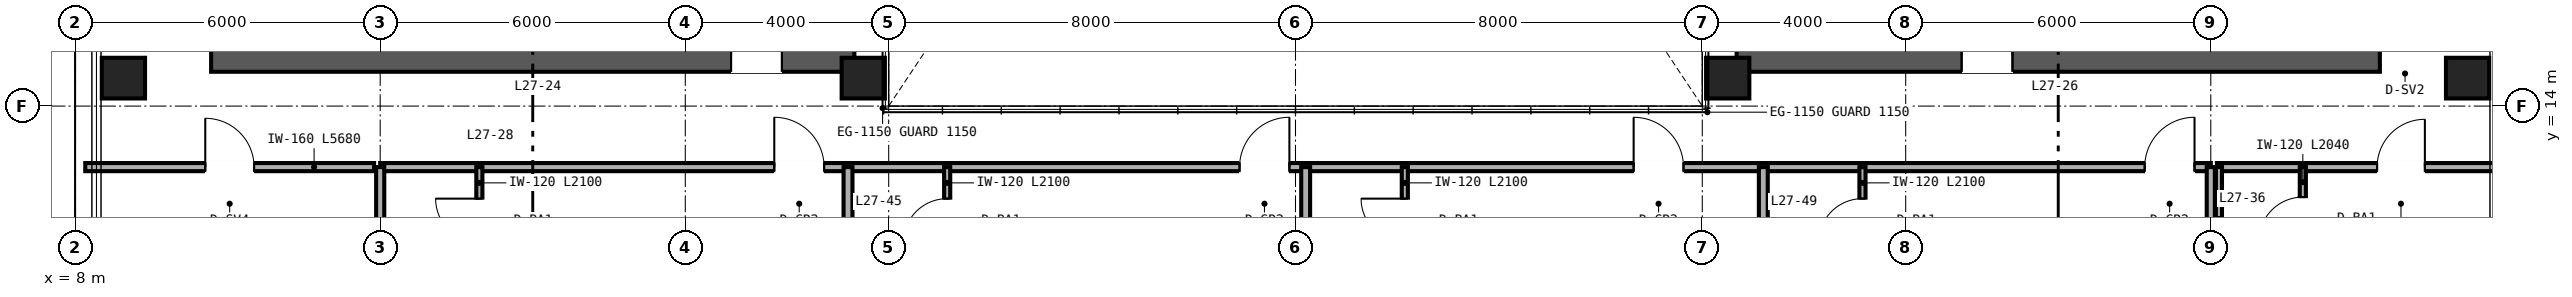
"""IFC4 building model, lengths in metres.
Left out: names, types, materials, properties, quantities, classifications, styles, units other than length and angle.
Written with IfcOpenShell. Run it as: python <this file> out.ifc"""

import sys

from ifc_helpers import new_model, si_unit, direction, frame, frame_2d, origin, origin_2d, place, context, subcontext, project, spatial, rectangle, hollow_rectangle, extrude, source, transform, mapped, element, fill, save


model = new_model("IFC4")
c1 = context("Model", 3, precision=1e-05, world=origin(), true_north=direction((0.0, 1.0)))
c2 = subcontext(c1, "Body", "Model", "MODEL_VIEW")
j1 = project(units=[si_unit("LENGTHUNIT", "METRE"), si_unit("PLANEANGLEUNIT", "RADIAN")], contexts=[c1])
p1 = place(None, origin())
s1 = spatial("IfcSite", under=j1, at=p1, CompositionType="ELEMENT")
p2 = place(p1, origin())
s2 = spatial("IfcBuilding", under=s1, at=p2, CompositionType="ELEMENT")
p3 = place(p2, frame((0.0, 0.0, 111.6)))
s3 = spatial("IfcBuildingStorey", under=s2, at=p3, CompositionType="ELEMENT", Elevation=111.6)
p4 = place(p3, frame((10.675, 15.0, 0.0), z_axis=(0.0, 0.0, 1.0), x_axis=(1.0, 0.0, 0.0)))
e1 = element("IfcWall", 1, at=p4, inside=s3, PredefinedType="SHEAR", context=c2, shape_type="SweptSolid", body=[
    extrude(rectangle(XDim=12.65, YDim=0.65, at=frame_2d((6.325, 0.0))), origin(), (0.0, 0.0, 1.0), 3.36),
])
p5 = place(p4, frame((10.225, 0.0, 0.0)))
e2 = element("IfcOpeningElement", 2, at=p5, cuts=e1, PredefinedType="OPENING", context=c2, shape_type="SweptSolid", body=[
    extrude(rectangle(XDim=1.0, YDim=2.15, at=frame_2d((0.5, 1.075))), frame((0.0, 0.335, 0.0), z_axis=(0.0, -1.0, 0.0), x_axis=(1.0, 0.0, 0.0)), (0.0, 0.0, 1.0), 0.67),
])
p6 = place(p3, frame((40.675, 15.0, 0.0), z_axis=(0.0, 0.0, 1.0), x_axis=(1.0, 0.0, 0.0)))
e3 = element("IfcWall", 3, at=p6, inside=s3, PredefinedType="SHEAR", context=c2, shape_type="SweptSolid", body=[
    extrude(rectangle(XDim=12.65, YDim=0.65, at=frame_2d((6.325, 0.0))), origin(), (0.0, 0.0, 1.0), 3.36),
])
p7 = place(p6, frame((4.425, 0.0, 0.0)))
e4 = element("IfcOpeningElement", 4, at=p7, cuts=e3, PredefinedType="OPENING", context=c2, shape_type="SweptSolid", body=[
    extrude(rectangle(XDim=1.0, YDim=2.15, at=frame_2d((0.5, 1.075))), frame((0.0, 0.335, 0.0), z_axis=(0.0, -1.0, 0.0), x_axis=(1.0, 0.0, 0.0)), (0.0, 0.0, 1.0), 0.67),
])
m1 = source(origin(), c2, "Body", "SweptSolid", [
    extrude(hollow_rectangle(XDim=0.85, YDim=0.8, WallThickness=0.032, at=origin_2d()), origin(), (0.0, 0.0, 1.0), 3.36),
])
for number, where, z_axis, x_axis in (
    (5, (8.95, 14.55, 0.0), (0.0, 0.0, 1.0), (1.0, 0.0, 0.0)),
    (6, (23.5, 14.55, 0.0), (0.0, 0.0, 1.0), (1.0, 0.0, 0.0)),
    (7, (40.5, 14.55, 0.0), (0.0, 0.0, 1.0), (1.0, 0.0, 0.0)),
    (8, (55.05, 14.55, 0.0), (0.0, 0.0, 1.0), (1.0, 0.0, 0.0)),
):
    element("IfcColumn", number, at=place(p3, frame(where, z_axis=z_axis, x_axis=x_axis)), inside=s3, PredefinedType="COLUMN", context=c2, shape_type="MappedRepresentation", body=[
        mapped(m1, transform((0.0, 0.0, 0.0), scale=1.0)),
    ])
p8 = place(p3, frame((8.2, 12.8, 0.0), z_axis=(0.0, 0.0, 1.0), x_axis=(1.0, 0.0, 0.0)))
e9 = element("IfcWall", 9, at=p8, inside=s3, PredefinedType="PARTITIONING", context=c2, shape_type="SweptSolid", body=[
    extrude(rectangle(XDim=5.68, YDim=0.16, at=frame_2d((2.84, 0.0))), origin(), (0.0, 0.0, 1.0), 3.36),
])
p9 = place(p8, frame((2.36, 0.0, 0.0)))
e10 = element("IfcOpeningElement", 10, at=p9, cuts=e9, PredefinedType="OPENING", context=c2, shape_type="SweptSolid", body=[
    extrude(rectangle(XDim=0.96, YDim=2.15, at=frame_2d((0.48, 1.075))), frame((0.0, 0.09, 0.0), z_axis=(0.0, -1.0, 0.0), x_axis=(1.0, 0.0, 0.0)), (0.0, 0.0, 1.0), 0.18),
])
p10 = place(p3, frame((50.12, 12.8, 0.0), z_axis=(0.0, 0.0, 1.0), x_axis=(1.0, 0.0, 0.0)))
e11 = element("IfcWall", 11, at=p10, inside=s3, PredefinedType="PARTITIONING", context=c2, shape_type="SweptSolid", body=[
    extrude(rectangle(XDim=5.68, YDim=0.16, at=frame_2d((2.84, 0.0))), origin(), (0.0, 0.0, 1.0), 3.36),
])
p11 = place(p10, frame((3.15, 0.0, 0.0)))
e12 = element("IfcOpeningElement", 12, at=p11, cuts=e11, PredefinedType="OPENING", context=c2, shape_type="SweptSolid", body=[
    extrude(rectangle(XDim=0.94, YDim=2.15, at=frame_2d((0.47, 1.075))), frame((0.0, 0.09, 0.0), z_axis=(0.0, -1.0, 0.0), x_axis=(1.0, 0.0, 0.0)), (0.0, 0.0, 1.0), 0.18),
])
p12 = place(p3, frame((51.81, 10.76, 0.0), z_axis=(0.0, 0.0, 1.0), x_axis=(0.0, 1.0, 0.0)))
e13 = element("IfcWall", 13, at=p12, inside=s3, PredefinedType="PARTITIONING", context=c2, shape_type="SweptSolid", body=[
    extrude(rectangle(XDim=2.04, YDim=0.12, at=frame_2d((1.02, 0.0))), origin(), (0.0, 0.0, 1.0), 3.36),
])
p13 = place(p12, frame((0.59, 0.0, 0.0)))
e14 = element("IfcOpeningElement", 14, at=p13, cuts=e13, PredefinedType="OPENING", context=c2, shape_type="SweptSolid", body=[
    extrude(rectangle(XDim=0.86, YDim=2.1, at=frame_2d((0.43, 1.05))), frame((0.0, 0.07, 0.0), z_axis=(0.0, -1.0, 0.0), x_axis=(1.0, 0.0, 0.0)), (0.0, 0.0, 1.0), 0.14),
])
p14 = place(p3, frame((50.16, 10.76, 0.0), z_axis=(0.0, 0.0, 1.0), x_axis=(0.0, 1.0, 0.0)))
e15 = element("IfcWall", 15, at=p14, inside=s3, PredefinedType="PARTITIONING", context=c2, shape_type="SweptSolid", body=[
    extrude(rectangle(XDim=2.04, YDim=0.12, at=frame_2d((1.02, 0.0))), origin(), (0.0, 0.0, 1.0), 3.36),
])
p15 = place(p3, frame((14.0, 12.8, 0.0), z_axis=(0.0, 0.0, 1.0), x_axis=(1.0, 0.0, 0.0)))
e16 = element("IfcWall", 16, at=p15, inside=s3, PredefinedType="PARTITIONING", context=c2, shape_type="SweptSolid", body=[
    extrude(rectangle(XDim=36.0, YDim=0.16, at=frame_2d((18.0, 0.0))), origin(), (0.0, 0.0, 1.0), 2.581),
])
p16 = place(p15, frame((7.75, 0.0, 0.0)))
e17 = element("IfcOpeningElement", 17, at=p16, cuts=e16, PredefinedType="OPENING", context=c2, shape_type="SweptSolid", body=[
    extrude(rectangle(XDim=0.98, YDim=2.2, at=frame_2d((0.49, 1.1))), frame((0.0, 0.09, 0.0), z_axis=(0.0, -1.0, 0.0), x_axis=(1.0, 0.0, 0.0)), (0.0, 0.0, 1.0), 0.18),
])
p17 = place(p15, frame((16.9, 0.0, 0.0)))
e18 = element("IfcOpeningElement", 18, at=p17, cuts=e16, PredefinedType="OPENING", context=c2, shape_type="SweptSolid", body=[
    extrude(rectangle(XDim=0.98, YDim=2.2, at=frame_2d((0.49, 1.1))), frame((0.0, 0.09, 0.0), z_axis=(0.0, -1.0, 0.0), x_axis=(1.0, 0.0, 0.0)), (0.0, 0.0, 1.0), 0.18),
])
p18 = place(p15, frame((24.65, 0.0, 0.0)))
e19 = element("IfcOpeningElement", 19, at=p18, cuts=e16, PredefinedType="OPENING", context=c2, shape_type="SweptSolid", body=[
    extrude(rectangle(XDim=0.98, YDim=2.2, at=frame_2d((0.49, 1.1))), frame((0.0, 0.09, 0.0), z_axis=(0.0, -1.0, 0.0), x_axis=(1.0, 0.0, 0.0)), (0.0, 0.0, 1.0), 0.18),
])
p19 = place(p15, frame((34.7, 0.0, 0.0)))
e20 = element("IfcOpeningElement", 20, at=p19, cuts=e16, PredefinedType="OPENING", context=c2, shape_type="SweptSolid", body=[
    extrude(rectangle(XDim=0.98, YDim=2.2, at=frame_2d((0.49, 1.1))), frame((0.0, 0.09, 0.0), z_axis=(0.0, -1.0, 0.0), x_axis=(1.0, 0.0, 0.0)), (0.0, 0.0, 1.0), 0.18),
])
for number, where, z_axis, x_axis in (
    (21, (14.0, 2.36, 0.0), (0.0, 0.0, 1.0), (0.0, 1.0, 0.0)),
    (22, (50.0, 2.36, 0.0), (0.0, 0.0, 1.0), (0.0, 1.0, 0.0)),
):
    element("IfcWall", number, at=place(p3, frame(where, z_axis=z_axis, x_axis=x_axis)), inside=s3, PredefinedType="PARTITIONING", context=c2, shape_type="SweptSolid", body=[
        extrude(rectangle(XDim=10.44, YDim=0.16, at=frame_2d((5.22, 0.0))), origin(), (0.0, 0.0, 1.0), 2.667),
    ])
p20 = place(p3, frame((23.2, 2.36, 0.0), z_axis=(0.0, 0.0, 1.0), x_axis=(0.0, 1.0, 0.0)))
e23 = element("IfcWall", 23, at=p20, inside=s3, PredefinedType="PARTITIONING", context=c2, shape_type="SweptSolid", body=[
    extrude(rectangle(XDim=10.44, YDim=0.175, at=frame_2d((5.22, 0.0))), origin(), (0.0, 0.0, 1.0), 2.433),
])
p21 = place(p3, frame((15.95, 10.7, 0.0), z_axis=(0.0, 0.0, 1.0), x_axis=(0.0, 1.0, 0.0)))
e24 = element("IfcWall", 24, at=p21, inside=s3, PredefinedType="PARTITIONING", context=c2, shape_type="SweptSolid", body=[
    extrude(rectangle(XDim=2.1, YDim=0.12, at=frame_2d((1.05, 0.0))), origin(), (0.0, 0.0, 1.0), 3.36),
])
p22 = place(p21, frame((0.62, 0.0, 0.0)))
e25 = element("IfcOpeningElement", 25, at=p22, cuts=e24, PredefinedType="OPENING", context=c2, shape_type="SweptSolid", body=[
    extrude(rectangle(XDim=0.86, YDim=2.1, at=frame_2d((0.43, 1.05))), frame((0.0, 0.07, 0.0), z_axis=(0.0, -1.0, 0.0), x_axis=(1.0, 0.0, 0.0)), (0.0, 0.0, 1.0), 0.14),
])
p23 = place(p3, frame((32.2, 2.36, 0.0), z_axis=(0.0, 0.0, 1.0), x_axis=(0.0, 1.0, 0.0)))
e26 = element("IfcWall", 26, at=p23, inside=s3, PredefinedType="PARTITIONING", context=c2, shape_type="SweptSolid", body=[
    extrude(rectangle(XDim=10.44, YDim=0.175, at=frame_2d((5.22, 0.0))), origin(), (0.0, 0.0, 1.0), 2.433),
])
p24 = place(p3, frame((25.15, 10.7, 0.0), z_axis=(0.0, 0.0, 1.0), x_axis=(0.0, 1.0, 0.0)))
e27 = element("IfcWall", 27, at=p24, inside=s3, PredefinedType="PARTITIONING", context=c2, shape_type="SweptSolid", body=[
    extrude(rectangle(XDim=2.1, YDim=0.12, at=frame_2d((1.05, 0.0))), origin(), (0.0, 0.0, 1.0), 3.36),
])
p25 = place(p24, frame((0.62, 0.0, 0.0)))
e28 = element("IfcOpeningElement", 28, at=p25, cuts=e27, PredefinedType="OPENING", context=c2, shape_type="SweptSolid", body=[
    extrude(rectangle(XDim=0.86, YDim=2.1, at=frame_2d((0.43, 1.05))), frame((0.0, 0.07, 0.0), z_axis=(0.0, -1.0, 0.0), x_axis=(1.0, 0.0, 0.0)), (0.0, 0.0, 1.0), 0.14),
])
p26 = place(p3, frame((41.2, 2.36, 0.0), z_axis=(0.0, 0.0, 1.0), x_axis=(0.0, 1.0, 0.0)))
e29 = element("IfcWall", 29, at=p26, inside=s3, PredefinedType="PARTITIONING", context=c2, shape_type="SweptSolid", body=[
    extrude(rectangle(XDim=10.44, YDim=0.175, at=frame_2d((5.22, 0.0))), origin(), (0.0, 0.0, 1.0), 2.823),
])
p27 = place(p3, frame((34.15, 10.7, 0.0), z_axis=(0.0, 0.0, 1.0), x_axis=(0.0, 1.0, 0.0)))
e30 = element("IfcWall", 30, at=p27, inside=s3, PredefinedType="PARTITIONING", context=c2, shape_type="SweptSolid", body=[
    extrude(rectangle(XDim=2.1, YDim=0.12, at=frame_2d((1.05, 0.0))), origin(), (0.0, 0.0, 1.0), 3.36),
])
p28 = place(p27, frame((0.62, 0.0, 0.0)))
e31 = element("IfcOpeningElement", 31, at=p28, cuts=e30, PredefinedType="OPENING", context=c2, shape_type="SweptSolid", body=[
    extrude(rectangle(XDim=0.86, YDim=2.1, at=frame_2d((0.43, 1.05))), frame((0.0, 0.07, 0.0), z_axis=(0.0, -1.0, 0.0), x_axis=(1.0, 0.0, 0.0)), (0.0, 0.0, 1.0), 0.14),
])
p29 = place(p3, frame((43.15, 10.7, 0.0), z_axis=(0.0, 0.0, 1.0), x_axis=(0.0, 1.0, 0.0)))
e32 = element("IfcWall", 32, at=p29, inside=s3, PredefinedType="PARTITIONING", context=c2, shape_type="SweptSolid", body=[
    extrude(rectangle(XDim=2.1, YDim=0.12, at=frame_2d((1.05, 0.0))), origin(), (0.0, 0.0, 1.0), 3.36),
])
p30 = place(p29, frame((0.62, 0.0, 0.0)))
e33 = element("IfcOpeningElement", 33, at=p30, cuts=e32, PredefinedType="OPENING", context=c2, shape_type="SweptSolid", body=[
    extrude(rectangle(XDim=0.86, YDim=2.1, at=frame_2d((0.43, 1.05))), frame((0.0, 0.07, 0.0), z_axis=(0.0, -1.0, 0.0), x_axis=(1.0, 0.0, 0.0)), (0.0, 0.0, 1.0), 0.14),
])
m2 = source(origin(), c2, "Body", "SweptSolid", [
    extrude(rectangle(XDim=1.0, YDim=2.15, at=frame_2d((0.5, 1.075))), frame((0.0, 0.025, 0.0), z_axis=(0.0, -1.0, 0.0), x_axis=(1.0, 0.0, 0.0)), (0.0, 0.0, 1.0), 0.05),
])
p31 = place(p5, origin())
e34 = element("IfcDoor", 34, at=p31, inside=s3, OperationType="SINGLE_SWING_LEFT", PredefinedType="DOOR", context=c2, shape_type="MappedRepresentation", body=[
    mapped(m2, transform((0.0, 0.0, 0.0), scale=1.0)),
])
fill(e2, e34)
p32 = place(p7, origin())
e35 = element("IfcDoor", 35, at=p32, inside=s3, OperationType="SINGLE_SWING_RIGHT", PredefinedType="DOOR", context=c2, shape_type="MappedRepresentation", body=[
    mapped(m2, transform((0.0, 0.0, 0.0), scale=1.0)),
])
fill(e4, e35)
m3 = source(origin(), c2, "Body", "SweptSolid", [
    extrude(rectangle(XDim=0.96, YDim=2.15, at=frame_2d((0.48, 1.075))), frame((0.0, 0.025, 0.0), z_axis=(0.0, -1.0, 0.0), x_axis=(1.0, 0.0, 0.0)), (0.0, 0.0, 1.0), 0.05),
])
p33 = place(p9, origin())
e36 = element("IfcDoor", 36, at=p33, inside=s3, OperationType="SINGLE_SWING_LEFT", PredefinedType="DOOR", context=c2, shape_type="MappedRepresentation", body=[
    mapped(m3, transform((0.0, 0.0, 0.0), scale=1.0)),
])
fill(e10, e36)
m4 = source(origin(), c2, "Body", "SweptSolid", [
    extrude(rectangle(XDim=0.86, YDim=2.1, at=frame_2d((0.43, 1.05))), frame((0.0, 0.025, 0.0), z_axis=(0.0, -1.0, 0.0), x_axis=(1.0, 0.0, 0.0)), (0.0, 0.0, 1.0), 0.05),
])
p34 = place(p13, origin())
e37 = element("IfcDoor", 37, at=p34, inside=s3, OperationType="SINGLE_SWING_LEFT", PredefinedType="DOOR", context=c2, shape_type="MappedRepresentation", body=[
    mapped(m4, transform((0.0, 0.0, 0.0), scale=1.0)),
])
fill(e14, e37)
m5 = source(origin(), c2, "Body", "SweptSolid", [
    extrude(rectangle(XDim=0.94, YDim=2.15, at=frame_2d((0.47, 1.075))), frame((0.0, 0.025, 0.0), z_axis=(0.0, -1.0, 0.0), x_axis=(1.0, 0.0, 0.0)), (0.0, 0.0, 1.0), 0.05),
])
p35 = place(p11, origin())
e38 = element("IfcDoor", 38, at=p35, inside=s3, OperationType="SINGLE_SWING_RIGHT", PredefinedType="DOOR", context=c2, shape_type="MappedRepresentation", body=[
    mapped(m5, transform((0.0, 0.0, 0.0), scale=1.0)),
])
fill(e12, e38)
p36 = place(p22, origin())
e39 = element("IfcDoor", 39, at=p36, inside=s3, OperationType="SINGLE_SWING_RIGHT", PredefinedType="DOOR", context=c2, shape_type="MappedRepresentation", body=[
    mapped(m4, transform((0.0, 0.0, 0.0), scale=1.0)),
])
fill(e25, e39)
p37 = place(p25, origin())
e40 = element("IfcDoor", 40, at=p37, inside=s3, OperationType="SINGLE_SWING_LEFT", PredefinedType="DOOR", context=c2, shape_type="MappedRepresentation", body=[
    mapped(m4, transform((0.0, 0.0, 0.0), scale=1.0)),
])
fill(e28, e40)
p38 = place(p28, origin())
e41 = element("IfcDoor", 41, at=p38, inside=s3, OperationType="SINGLE_SWING_RIGHT", PredefinedType="DOOR", context=c2, shape_type="MappedRepresentation", body=[
    mapped(m4, transform((0.0, 0.0, 0.0), scale=1.0)),
])
fill(e31, e41)
p39 = place(p30, origin())
e42 = element("IfcDoor", 42, at=p39, inside=s3, OperationType="SINGLE_SWING_LEFT", PredefinedType="DOOR", context=c2, shape_type="MappedRepresentation", body=[
    mapped(m4, transform((0.0, 0.0, 0.0), scale=1.0)),
])
fill(e33, e42)
m6 = source(origin(), c2, "Body", "SweptSolid", [
    extrude(rectangle(XDim=0.98, YDim=2.2, at=frame_2d((0.49, 1.1))), frame((0.0, 0.025, 0.0), z_axis=(0.0, -1.0, 0.0), x_axis=(1.0, 0.0, 0.0)), (0.0, 0.0, 1.0), 0.05),
])
p40 = place(p16, origin())
e43 = element("IfcDoor", 43, at=p40, inside=s3, OperationType="SINGLE_SWING_LEFT", PredefinedType="DOOR", context=c2, shape_type="MappedRepresentation", body=[
    mapped(m6, transform((0.0, 0.0, 0.0), scale=1.0)),
])
fill(e17, e43)
p41 = place(p17, origin())
e44 = element("IfcDoor", 44, at=p41, inside=s3, OperationType="SINGLE_SWING_RIGHT", PredefinedType="DOOR", context=c2, shape_type="MappedRepresentation", body=[
    mapped(m6, transform((0.0, 0.0, 0.0), scale=1.0)),
])
fill(e18, e44)
p42 = place(p18, origin())
e45 = element("IfcDoor", 45, at=p42, inside=s3, OperationType="SINGLE_SWING_LEFT", PredefinedType="DOOR", context=c2, shape_type="MappedRepresentation", body=[
    mapped(m6, transform((0.0, 0.0, 0.0), scale=1.0)),
])
fill(e19, e45)
p43 = place(p19, origin())
e46 = element("IfcDoor", 46, at=p43, inside=s3, OperationType="SINGLE_SWING_RIGHT", PredefinedType="DOOR", context=c2, shape_type="MappedRepresentation", body=[
    mapped(m6, transform((0.0, 0.0, 0.0), scale=1.0)),
])
fill(e20, e46)
save(model, sys.argv[1])
